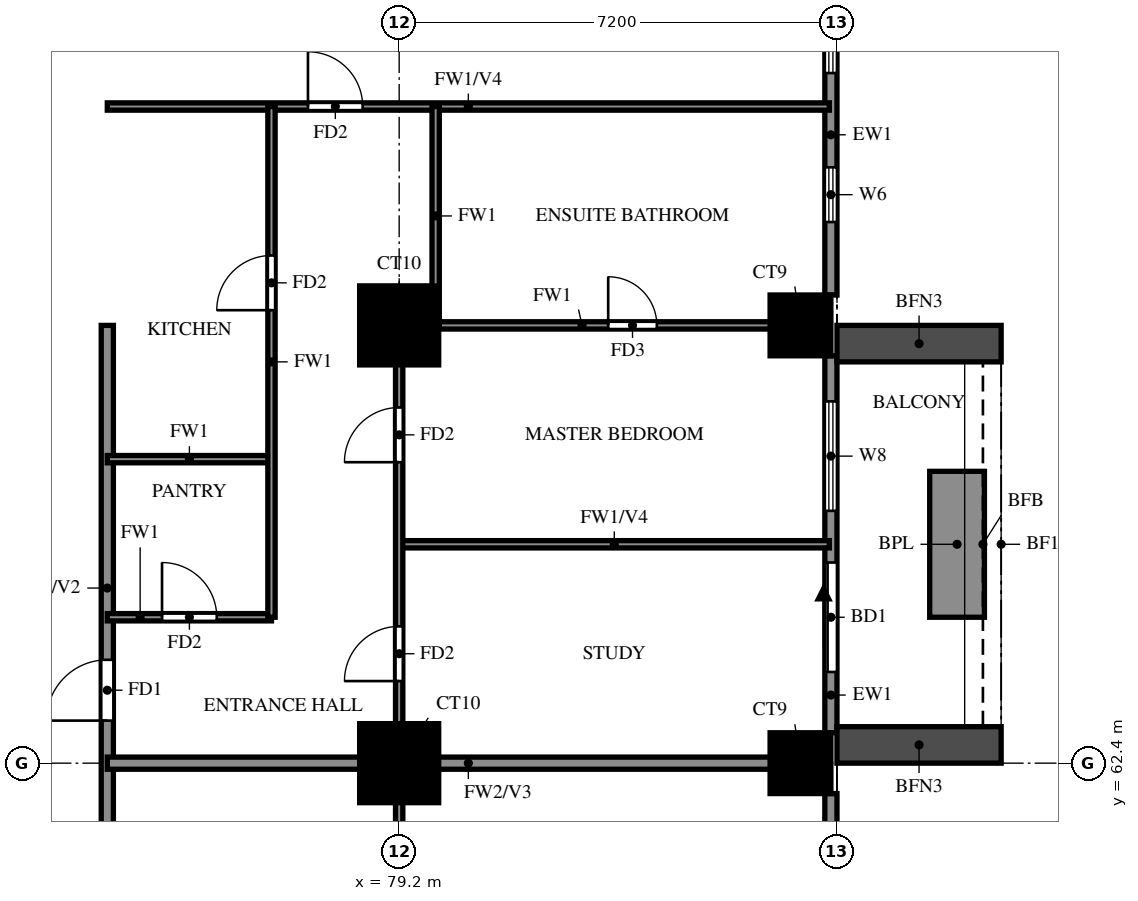
"""IFC4 building model, lengths in metres.
Left out: names, types, materials, properties, quantities, classifications, styles, units other than length and angle.
Written with IfcOpenShell. Run it as: python <this file> out.ifc"""

import sys

from ifc_helpers import new_model, si_unit, direction, frame, frame_2d, origin, origin_2d, place, context, subcontext, project, spatial, rectangle, extrude, source, transform, mapped, element, fill, save


model = new_model("IFC4")
c1 = context("Model", 3, precision=1e-05, world=origin(), true_north=direction((0.0, 1.0)))
c2 = subcontext(c1, "Body", "Model", "MODEL_VIEW")
j1 = project(units=[si_unit("LENGTHUNIT", "METRE"), si_unit("PLANEANGLEUNIT", "RADIAN")], contexts=[c1])
p1 = place(None, origin())
s1 = spatial("IfcSite", under=j1, at=p1, CompositionType="ELEMENT")
p2 = place(p1, origin())
s2 = spatial("IfcBuilding", under=s1, at=p2, CompositionType="ELEMENT")
p3 = place(p2, frame((0.0, 0.0, 62.0)))
s3 = spatial("IfcBuildingStorey", under=s2, at=p3, CompositionType="ELEMENT", Elevation=62.0)
m1 = source(origin(), c2, "Body", "SweptSolid", [
    extrude(rectangle(XDim=1.3, YDim=1.3, at=origin_2d()), origin(), (0.0, 0.0, 1.0), 3.18),
])
p4 = place(p3, frame((79.2, 62.4, 0.0), z_axis=(0.0, 0.0, 1.0), x_axis=(1.0, 0.0, 0.0)))
e1 = element("IfcColumn", 1, at=p4, inside=s3, PredefinedType="COLUMN", context=c2, shape_type="MappedRepresentation", body=[
    mapped(m1, transform((0.0, 0.0, 0.0))),
])
m2 = source(origin(), c2, "Body", "SweptSolid", [
    extrude(rectangle(XDim=1.0, YDim=1.0, at=origin_2d()), origin(), (0.0, 0.0, 1.0), 3.18),
])
p5 = place(p3, frame((85.8, 62.4, 0.0), z_axis=(0.0, 0.0, 1.0), x_axis=(1.0, 0.0, 0.0)))
e2 = element("IfcColumn", 2, at=p5, inside=s3, PredefinedType="COLUMN", context=c2, shape_type="MappedRepresentation", body=[
    mapped(m2, transform((0.0, 0.0, 0.0))),
])
p6 = place(p3, frame((79.2, 69.6, 0.0), z_axis=(0.0, 0.0, 1.0), x_axis=(1.0, 0.0, 0.0)))
e3 = element("IfcColumn", 3, at=p6, inside=s3, PredefinedType="COLUMN", context=c2, shape_type="MappedRepresentation", body=[
    mapped(m1, transform((0.0, 0.0, 0.0))),
])
p7 = place(p3, frame((85.8, 69.6, 0.0), z_axis=(0.0, 0.0, 1.0), x_axis=(1.0, 0.0, 0.0)))
e4 = element("IfcColumn", 4, at=p7, inside=s3, PredefinedType="COLUMN", context=c2, shape_type="MappedRepresentation", body=[
    mapped(m2, transform((0.0, 0.0, 0.0))),
])
p8 = place(p3, frame((86.3, 55.7, 0.0), z_axis=(0.0, 0.0, 1.0), x_axis=(0.0, 1.0, 0.0)))
e5 = element("IfcWall", 5, at=p8, inside=s3, PredefinedType="SOLIDWALL", context=c2, shape_type="SweptSolid", body=[
    extrude(rectangle(XDim=6.2, YDim=0.2, at=frame_2d((3.1, 0.0))), origin(), (0.0, 0.0, 1.0), 3.18),
])
p9 = place(p8, frame((1.9, 0.0, 0.6)))
e6 = element("IfcOpeningElement", 6, at=p9, cuts=e5, PredefinedType="OPENING", context=c2, shape_type="SweptSolid", body=[
    extrude(rectangle(XDim=2.4, YDim=2.4, at=frame_2d((1.2, 1.2))), frame((0.0, 0.11, 0.0), z_axis=(0.0, -1.0, 0.0), x_axis=(1.0, 0.0, 0.0)), (0.0, 0.0, 1.0), 0.22),
])
p10 = place(p3, frame((86.3, 62.9, 0.0), z_axis=(0.0, 0.0, 1.0), x_axis=(0.0, 1.0, 0.0)))
e7 = element("IfcWall", 7, at=p10, inside=s3, PredefinedType="SOLIDWALL", context=c2, shape_type="SweptSolid", body=[
    extrude(rectangle(XDim=6.2, YDim=0.2, at=frame_2d((3.1, 0.0))), origin(), (0.0, 0.0, 1.0), 3.18),
])
p11 = place(p10, frame((1.0, 0.0, 0.0)))
e8 = element("IfcOpeningElement", 8, at=p11, cuts=e7, PredefinedType="OPENING", context=c2, shape_type="SweptSolid", body=[
    extrude(rectangle(XDim=1.8, YDim=2.4, at=frame_2d((0.9, 1.2))), frame((0.0, 0.11, 0.0), z_axis=(0.0, -1.0, 0.0), x_axis=(1.0, 0.0, 0.0)), (0.0, 0.0, 1.0), 0.22),
])
p12 = place(p10, frame((3.65, 0.0, 0.6)))
e9 = element("IfcOpeningElement", 9, at=p12, cuts=e7, PredefinedType="OPENING", context=c2, shape_type="SweptSolid", body=[
    extrude(rectangle(XDim=1.8, YDim=2.4, at=frame_2d((0.9, 1.2))), frame((0.0, 0.11, 0.0), z_axis=(0.0, -1.0, 0.0), x_axis=(1.0, 0.0, 0.0)), (0.0, 0.0, 1.0), 0.22),
])
p13 = place(p3, frame((86.3, 70.1, 0.0), z_axis=(0.0, 0.0, 1.0), x_axis=(0.0, 1.0, 0.0)))
e10 = element("IfcWall", 10, at=p13, inside=s3, PredefinedType="SOLIDWALL", context=c2, shape_type="SweptSolid", body=[
    extrude(rectangle(XDim=6.2, YDim=0.2, at=frame_2d((3.1, 0.0))), origin(), (0.0, 0.0, 1.0), 3.18),
])
p14 = place(p13, frame((1.2, 0.0, 1.5)))
e11 = element("IfcOpeningElement", 11, at=p14, cuts=e10, PredefinedType="OPENING", context=c2, shape_type="SweptSolid", body=[
    extrude(rectangle(XDim=0.9, YDim=0.9, at=frame_2d((0.45, 0.45))), frame((0.0, 0.11, 0.0), z_axis=(0.0, -1.0, 0.0), x_axis=(1.0, 0.0, 0.0)), (0.0, 0.0, 1.0), 0.22),
])
p15 = place(p13, frame((3.65, 0.0, 0.6)))
e12 = element("IfcOpeningElement", 12, at=p15, cuts=e10, PredefinedType="OPENING", context=c2, shape_type="SweptSolid", body=[
    extrude(rectangle(XDim=1.8, YDim=2.4, at=frame_2d((0.9, 1.2))), frame((0.0, 0.11, 0.0), z_axis=(0.0, -1.0, 0.0), x_axis=(1.0, 0.0, 0.0)), (0.0, 0.0, 1.0), 0.22),
])
for number, where, z_axis, x_axis in (
    (13, (86.4, 62.7, 0.0), (0.0, 0.0, 1.0), (1.0, 0.0, 0.0)),
    (14, (86.4, 69.3, 0.0), (0.0, 0.0, 1.0), (1.0, 0.0, 0.0)),
):
    element("IfcWall", number, at=place(p3, frame(where, z_axis=z_axis, x_axis=x_axis)), inside=s3, PredefinedType="SOLIDWALL", context=c2, shape_type="SweptSolid", body=[
        extrude(rectangle(XDim=2.7, YDim=0.6, at=frame_2d((1.35, 0.0))), origin(), (0.0, 0.0, 1.0), 2.85),
    ])
p16 = place(p3, frame((88.375, 64.8, 0.0), z_axis=(0.0, 0.0, 1.0), x_axis=(0.0, 1.0, 0.0)))
e15 = element("IfcWall", 15, at=p16, inside=s3, PredefinedType="SOLIDWALL", context=c2, shape_type="SweptSolid", body=[
    extrude(rectangle(XDim=2.4, YDim=0.9, at=frame_2d((1.2, 0.0))), origin(), (0.0, 0.0, 1.0), 0.9),
])
p17 = place(p3, frame((74.4, 60.0, 0.0), z_axis=(0.0, 0.0, 1.0), x_axis=(0.0, 1.0, 0.0)))
e16 = element("IfcWall", 16, at=p17, inside=s3, PredefinedType="SOLIDWALL", context=c2, shape_type="SweptSolid", body=[
    extrude(rectangle(XDim=9.6, YDim=0.2, at=frame_2d((4.8, 0.0))), origin(), (0.0, 0.0, 1.0), 3.18),
])
p18 = place(p17, frame((3.1, 0.0, 0.0)))
e17 = element("IfcOpeningElement", 17, at=p18, cuts=e16, PredefinedType="OPENING", context=c2, shape_type="SweptSolid", body=[
    extrude(rectangle(XDim=1.0, YDim=2.1, at=frame_2d((0.5, 1.05))), frame((0.0, 0.11, 0.0), z_axis=(0.0, -1.0, 0.0), x_axis=(1.0, 0.0, 0.0)), (0.0, 0.0, 1.0), 0.22),
])
p19 = place(p3, frame((74.4, 62.4, 0.0), z_axis=(0.0, 0.0, 1.0), x_axis=(1.0, 0.0, 0.0)))
e18 = element("IfcWall", 18, at=p19, inside=s3, PredefinedType="SOLIDWALL", context=c2, shape_type="SweptSolid", body=[
    extrude(rectangle(XDim=11.875, YDim=0.2, at=frame_2d((5.938, 0.0))), origin(), (0.0, 0.0, 1.0), 3.18),
])
p20 = place(p3, frame((74.4, 64.8, 0.0), z_axis=(0.0, 0.0, 1.0), x_axis=(1.0, 0.0, 0.0)))
e19 = element("IfcWall", 19, at=p20, inside=s3, PredefinedType="PARTITIONING", context=c2, shape_type="SweptSolid", body=[
    extrude(rectangle(XDim=2.7, YDim=0.12, at=frame_2d((1.35, 0.0))), origin(), (0.0, 0.0, 1.0), 3.18),
])
p21 = place(p20, frame((0.9, 0.0, 0.0)))
e20 = element("IfcOpeningElement", 20, at=p21, cuts=e19, PredefinedType="OPENING", context=c2, shape_type="SweptSolid", body=[
    extrude(rectangle(XDim=0.9, YDim=2.1, at=frame_2d((0.45, 1.05))), frame((0.0, 0.07, 0.0), z_axis=(0.0, -1.0, 0.0), x_axis=(1.0, 0.0, 0.0)), (0.0, 0.0, 1.0), 0.14),
])
p22 = place(p3, frame((79.2, 66.0, 0.0), z_axis=(0.0, 0.0, 1.0), x_axis=(1.0, 0.0, 0.0)))
e21 = element("IfcWall", 21, at=p22, inside=s3, PredefinedType="PARTITIONING", context=c2, shape_type="SweptSolid", body=[
    extrude(rectangle(XDim=7.075, YDim=0.12, at=frame_2d((3.538, 0.0))), origin(), (0.0, 0.0, 1.0), 2.28),
])
p23 = place(p3, frame((74.4, 67.4, 0.0), z_axis=(0.0, 0.0, 1.0), x_axis=(1.0, 0.0, 0.0)))
e22 = element("IfcWall", 22, at=p23, inside=s3, PredefinedType="PARTITIONING", context=c2, shape_type="SweptSolid", body=[
    extrude(rectangle(XDim=2.7, YDim=0.12, at=frame_2d((1.35, 0.0))), origin(), (0.0, 0.0, 1.0), 3.18),
])
p24 = place(p3, frame((79.2, 69.6, 0.0), z_axis=(0.0, 0.0, 1.0), x_axis=(1.0, 0.0, 0.0)))
e23 = element("IfcWall", 23, at=p24, inside=s3, PredefinedType="PARTITIONING", context=c2, shape_type="SweptSolid", body=[
    extrude(rectangle(XDim=7.075, YDim=0.12, at=frame_2d((3.538, 0.0))), origin(), (0.0, 0.0, 1.0), 3.18),
])
p25 = place(p24, frame((3.438, 0.0, 0.0)))
e24 = element("IfcOpeningElement", 24, at=p25, cuts=e23, PredefinedType="OPENING", context=c2, shape_type="SweptSolid", body=[
    extrude(rectangle(XDim=0.8, YDim=2.1, at=frame_2d((0.4, 1.05))), frame((0.0, 0.07, 0.0), z_axis=(0.0, -1.0, 0.0), x_axis=(1.0, 0.0, 0.0)), (0.0, 0.0, 1.0), 0.14),
])
p26 = place(p3, frame((74.4, 73.2, 0.0), z_axis=(0.0, 0.0, 1.0), x_axis=(1.0, 0.0, 0.0)))
e25 = element("IfcWall", 25, at=p26, inside=s3, PredefinedType="PARTITIONING", context=c2, shape_type="SweptSolid", body=[
    extrude(rectangle(XDim=11.875, YDim=0.12, at=frame_2d((5.938, 0.0))), origin(), (0.0, 0.0, 1.0), 2.28),
])
p27 = place(p26, frame((3.3, 0.0, 0.0)))
e26 = element("IfcOpeningElement", 26, at=p27, cuts=e25, PredefinedType="OPENING", context=c2, shape_type="SweptSolid", body=[
    extrude(rectangle(XDim=0.9, YDim=2.1, at=frame_2d((0.45, 1.05))), frame((0.0, 0.07, 0.0), z_axis=(0.0, -1.0, 0.0), x_axis=(1.0, 0.0, 0.0)), (0.0, 0.0, 1.0), 0.14),
])
p28 = place(p3, frame((77.1, 64.8, 0.0), z_axis=(0.0, 0.0, 1.0), x_axis=(0.0, 1.0, 0.0)))
e27 = element("IfcWall", 27, at=p28, inside=s3, PredefinedType="PARTITIONING", context=c2, shape_type="SweptSolid", body=[
    extrude(rectangle(XDim=8.4, YDim=0.12, at=frame_2d((4.2, 0.0))), origin(), (0.0, 0.0, 1.0), 3.18),
])
p29 = place(p28, frame((5.05, 0.0, 0.0)))
e28 = element("IfcOpeningElement", 28, at=p29, cuts=e27, PredefinedType="OPENING", context=c2, shape_type="SweptSolid", body=[
    extrude(rectangle(XDim=0.9, YDim=2.1, at=frame_2d((0.45, 1.05))), frame((0.0, 0.07, 0.0), z_axis=(0.0, -1.0, 0.0), x_axis=(1.0, 0.0, 0.0)), (0.0, 0.0, 1.0), 0.14),
])
p30 = place(p3, frame((79.2, 48.125, 0.0), z_axis=(0.0, 0.0, 1.0), x_axis=(0.0, 1.0, 0.0)))
e29 = element("IfcWall", 29, at=p30, inside=s3, PredefinedType="PARTITIONING", context=c2, shape_type="SweptSolid", body=[
    extrude(rectangle(XDim=21.475, YDim=0.12, at=frame_2d((10.738, 0.0))), origin(), (0.0, 0.0, 1.0), 3.18),
])
p31 = place(p30, frame((1.288, 0.0, 0.0)))
e30 = element("IfcOpeningElement", 30, at=p31, cuts=e29, PredefinedType="OPENING", context=c2, shape_type="SweptSolid", body=[
    extrude(rectangle(XDim=0.9, YDim=2.1, at=frame_2d((0.45, 1.05))), frame((0.0, 0.07, 0.0), z_axis=(0.0, -1.0, 0.0), x_axis=(1.0, 0.0, 0.0)), (0.0, 0.0, 1.0), 0.14),
])
p32 = place(p30, frame((4.825, 0.0, 0.0)))
e31 = element("IfcOpeningElement", 31, at=p32, cuts=e29, PredefinedType="OPENING", context=c2, shape_type="SweptSolid", body=[
    extrude(rectangle(XDim=0.9, YDim=2.1, at=frame_2d((0.45, 1.05))), frame((0.0, 0.07, 0.0), z_axis=(0.0, -1.0, 0.0), x_axis=(1.0, 0.0, 0.0)), (0.0, 0.0, 1.0), 0.14),
])
p33 = place(p30, frame((9.925, 0.0, 0.0)))
e32 = element("IfcOpeningElement", 32, at=p33, cuts=e29, PredefinedType="OPENING", context=c2, shape_type="SweptSolid", body=[
    extrude(rectangle(XDim=1.5, YDim=2.1, at=frame_2d((0.75, 1.05))), frame((0.0, 0.07, 0.0), z_axis=(0.0, -1.0, 0.0), x_axis=(1.0, 0.0, 0.0)), (0.0, 0.0, 1.0), 0.14),
])
p34 = place(p30, frame((15.625, 0.0, 0.0)))
e33 = element("IfcOpeningElement", 33, at=p34, cuts=e29, PredefinedType="OPENING", context=c2, shape_type="SweptSolid", body=[
    extrude(rectangle(XDim=0.9, YDim=2.1, at=frame_2d((0.45, 1.05))), frame((0.0, 0.07, 0.0), z_axis=(0.0, -1.0, 0.0), x_axis=(1.0, 0.0, 0.0)), (0.0, 0.0, 1.0), 0.14),
])
p35 = place(p30, frame((19.225, 0.0, 0.0)))
e34 = element("IfcOpeningElement", 34, at=p35, cuts=e29, PredefinedType="OPENING", context=c2, shape_type="SweptSolid", body=[
    extrude(rectangle(XDim=0.9, YDim=2.1, at=frame_2d((0.45, 1.05))), frame((0.0, 0.07, 0.0), z_axis=(0.0, -1.0, 0.0), x_axis=(1.0, 0.0, 0.0)), (0.0, 0.0, 1.0), 0.14),
])
p36 = place(p3, frame((79.8, 69.6, 0.0), z_axis=(0.0, 0.0, 1.0), x_axis=(0.0, 1.0, 0.0)))
e35 = element("IfcWall", 35, at=p36, inside=s3, PredefinedType="PARTITIONING", context=c2, shape_type="SweptSolid", body=[
    extrude(rectangle(XDim=3.6, YDim=0.12, at=frame_2d((1.8, 0.0))), origin(), (0.0, 0.0, 1.0), 3.18),
])
p37 = place(p11, origin())
e36 = element("IfcDoor", 36, at=p37, inside=s3, OperationType="DOUBLE_DOOR_SLIDING", PredefinedType="DOOR", context=c2, shape_type="SweptSolid", body=[
    extrude(rectangle(XDim=1.8, YDim=2.4, at=frame_2d((0.9, 1.2))), frame((0.0, 0.025, 0.0), z_axis=(0.0, -1.0, 0.0), x_axis=(1.0, 0.0, 0.0)), (0.0, 0.0, 1.0), 0.05),
])
fill(e8, e36)
p38 = place(p12, origin())
e37 = element("IfcWindow", 37, at=p38, inside=s3, PartitioningType="DOUBLE_PANEL_VERTICAL", PredefinedType="WINDOW", context=c2, shape_type="SweptSolid", body=[
    extrude(rectangle(XDim=1.8, YDim=2.4, at=frame_2d((0.9, 1.2))), frame((0.0, 0.03, 0.0), z_axis=(0.0, -1.0, 0.0), x_axis=(1.0, 0.0, 0.0)), (0.0, 0.0, 1.0), 0.06),
])
fill(e9, e37)
p39 = place(p14, origin())
e38 = element("IfcWindow", 38, at=p39, inside=s3, PartitioningType="SINGLE_PANEL", PredefinedType="WINDOW", context=c2, shape_type="SweptSolid", body=[
    extrude(rectangle(XDim=0.9, YDim=0.9, at=frame_2d((0.45, 0.45))), frame((0.0, 0.03, 0.0), z_axis=(0.0, -1.0, 0.0), x_axis=(1.0, 0.0, 0.0)), (0.0, 0.0, 1.0), 0.06),
])
fill(e11, e38)
p40 = place(p15, origin())
e39 = element("IfcWindow", 39, at=p40, inside=s3, PartitioningType="DOUBLE_PANEL_VERTICAL", PredefinedType="WINDOW", context=c2, shape_type="SweptSolid", body=[
    extrude(rectangle(XDim=1.8, YDim=2.4, at=frame_2d((0.9, 1.2))), frame((0.0, 0.03, 0.0), z_axis=(0.0, -1.0, 0.0), x_axis=(1.0, 0.0, 0.0)), (0.0, 0.0, 1.0), 0.06),
])
fill(e12, e39)
p41 = place(p18, origin())
e40 = element("IfcDoor", 40, at=p41, inside=s3, OperationType="SINGLE_SWING_RIGHT", PredefinedType="DOOR", context=c2, shape_type="SweptSolid", body=[
    extrude(rectangle(XDim=1.0, YDim=2.1, at=frame_2d((0.5, 1.05))), frame((0.0, 0.025, 0.0), z_axis=(0.0, -1.0, 0.0), x_axis=(1.0, 0.0, 0.0)), (0.0, 0.0, 1.0), 0.05),
])
fill(e17, e40)
p42 = place(p34, origin())
e41 = element("IfcDoor", 41, at=p42, inside=s3, OperationType="SINGLE_SWING_LEFT", PredefinedType="DOOR", context=c2, shape_type="SweptSolid", body=[
    extrude(rectangle(XDim=0.9, YDim=2.1, at=frame_2d((0.45, 1.05))), frame((0.0, 0.025, 0.0), z_axis=(0.0, -1.0, 0.0), x_axis=(1.0, 0.0, 0.0)), (0.0, 0.0, 1.0), 0.05),
])
fill(e33, e41)
p43 = place(p35, origin())
e42 = element("IfcDoor", 42, at=p43, inside=s3, OperationType="SINGLE_SWING_LEFT", PredefinedType="DOOR", context=c2, shape_type="SweptSolid", body=[
    extrude(rectangle(XDim=0.9, YDim=2.1, at=frame_2d((0.45, 1.05))), frame((0.0, 0.025, 0.0), z_axis=(0.0, -1.0, 0.0), x_axis=(1.0, 0.0, 0.0)), (0.0, 0.0, 1.0), 0.05),
])
fill(e34, e42)
p44 = place(p25, origin())
e43 = element("IfcDoor", 43, at=p44, inside=s3, OperationType="SINGLE_SWING_RIGHT", PredefinedType="DOOR", context=c2, shape_type="SweptSolid", body=[
    extrude(rectangle(XDim=0.8, YDim=2.1, at=frame_2d((0.4, 1.05))), frame((0.0, 0.025, 0.0), z_axis=(0.0, -1.0, 0.0), x_axis=(1.0, 0.0, 0.0)), (0.0, 0.0, 1.0), 0.05),
])
fill(e24, e43)
p45 = place(p27, origin())
e44 = element("IfcDoor", 44, at=p45, inside=s3, OperationType="SINGLE_SWING_LEFT", PredefinedType="DOOR", context=c2, shape_type="SweptSolid", body=[
    extrude(rectangle(XDim=0.9, YDim=2.1, at=frame_2d((0.45, 1.05))), frame((0.0, 0.025, 0.0), z_axis=(0.0, -1.0, 0.0), x_axis=(1.0, 0.0, 0.0)), (0.0, 0.0, 1.0), 0.05),
])
fill(e26, e44)
p46 = place(p21, origin())
e45 = element("IfcDoor", 45, at=p46, inside=s3, OperationType="SINGLE_SWING_LEFT", PredefinedType="DOOR", context=c2, shape_type="SweptSolid", body=[
    extrude(rectangle(XDim=0.9, YDim=2.1, at=frame_2d((0.45, 1.05))), frame((0.0, 0.025, 0.0), z_axis=(0.0, -1.0, 0.0), x_axis=(1.0, 0.0, 0.0)), (0.0, 0.0, 1.0), 0.05),
])
fill(e20, e45)
p47 = place(p29, origin())
e46 = element("IfcDoor", 46, at=p47, inside=s3, OperationType="SINGLE_SWING_RIGHT", PredefinedType="DOOR", context=c2, shape_type="SweptSolid", body=[
    extrude(rectangle(XDim=0.9, YDim=2.1, at=frame_2d((0.45, 1.05))), frame((0.0, 0.025, 0.0), z_axis=(0.0, -1.0, 0.0), x_axis=(1.0, 0.0, 0.0)), (0.0, 0.0, 1.0), 0.05),
])
fill(e28, e46)
save(model, sys.argv[1])
